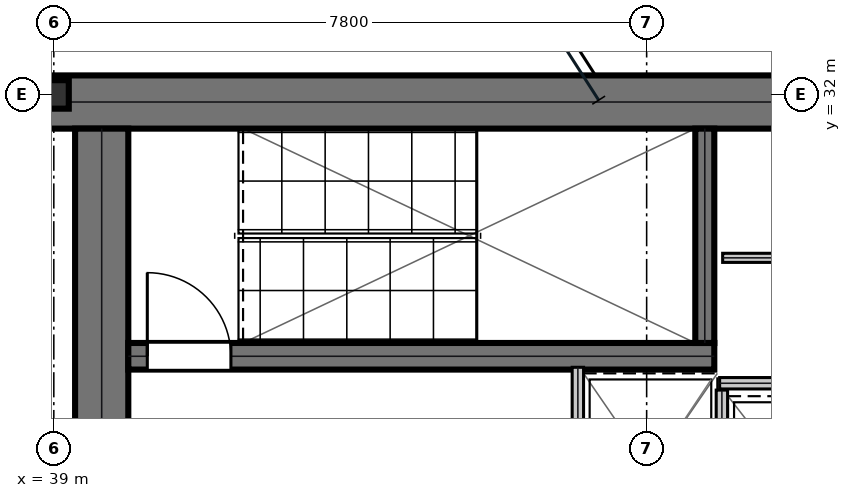
"""IFC4 building model, lengths in metres.
Left out: names, types, materials, properties, quantities, classifications, styles, units other than length and angle.
Written with IfcOpenShell. Run it as: python <this file> out.ifc"""

import sys

from ifc_helpers import new_model, si_unit, direction, frame, frame_2d, origin, origin_2d, place, context, subcontext, project, spatial, rectangle, i_section, extrude, element, fill, save


model = new_model("IFC4")
c1 = context("Model", 3, precision=1e-05, world=origin(), true_north=direction((0.0, 1.0)))
c2 = subcontext(c1, "Body", "Model", "MODEL_VIEW")
j1 = project(units=[si_unit("LENGTHUNIT", "METRE"), si_unit("PLANEANGLEUNIT", "RADIAN")], contexts=[c1])
p1 = place(None, origin())
s1 = spatial("IfcSite", under=j1, at=p1, CompositionType="ELEMENT")
p2 = place(p1, origin())
s2 = spatial("IfcBuilding", under=s1, at=p2, CompositionType="ELEMENT")
p3 = place(p2, frame((0.0, 0.0, 191.85)))
s3 = spatial("IfcBuildingStorey", under=s2, at=p3, CompositionType="ELEMENT", Elevation=191.85)
p4 = place(p3, frame((38.8, 31.9, 0.0), z_axis=(0.0, 0.0, 1.0), x_axis=(1.0, 0.0, 0.0)))
e1 = element("IfcWall", 1, at=p4, inside=s3, PredefinedType="SHEAR", context=c2, shape_type="SweptSolid", body=[
    extrude(rectangle(XDim=16.0, YDim=0.7, at=frame_2d((8.0, 0.0))), origin(), (0.0, 0.0, 1.0), 3.79),
])
p5 = place(p3, frame((39.63, 25.4, 0.0), z_axis=(0.0, 0.0, 1.0), x_axis=(0.0, 1.0, 0.0)))
e2 = element("IfcWall", 2, at=p5, inside=s3, PredefinedType="SHEAR", context=c2, shape_type="SweptSolid", body=[
    extrude(rectangle(XDim=6.15, YDim=0.7, at=frame_2d((3.075, 0.0))), origin(), (0.0, 0.0, 1.0), 3.79),
])
p6 = place(p3, frame((39.98, 28.555, 0.0), z_axis=(0.0, 0.0, 1.0), x_axis=(1.0, 0.0, 0.0)))
e3 = element("IfcWall", 3, at=p6, inside=s3, PredefinedType="SHEAR", context=c2, shape_type="SweptSolid", body=[
    extrude(rectangle(XDim=7.71, YDim=0.35, at=frame_2d((3.855, 0.0))), origin(), (0.0, 0.0, 1.0), 3.79),
])
p7 = place(p6, frame((0.25, 0.0, 0.0)))
e4 = element("IfcOpeningElement", 4, at=p7, cuts=e3, PredefinedType="OPENING", context=c2, shape_type="SweptSolid", body=[
    extrude(rectangle(XDim=1.1, YDim=2.15, at=frame_2d((0.55, 1.075))), frame((0.0, 0.185, 0.0), z_axis=(0.0, -1.0, 0.0), x_axis=(1.0, 0.0, 0.0)), (0.0, 0.0, 1.0), 0.37),
])
p8 = place(p3, frame((47.565, 28.73, 0.0), z_axis=(0.0, 0.0, 1.0), x_axis=(0.0, 1.0, 0.0)))
e5 = element("IfcWall", 5, at=p8, inside=s3, PredefinedType="SHEAR", context=c2, shape_type="SweptSolid", body=[
    extrude(rectangle(XDim=2.82, YDim=0.25, at=frame_2d((1.41, 0.0))), origin(), (0.0, 0.0, 1.0), 3.79),
])
p9 = place(p3, frame((39.0, 32.0, 0.0), z_axis=(0.0, 0.0, 1.0), x_axis=(1.0, 0.0, 0.0)))
e6 = element("IfcColumn", 6, at=p9, inside=s3, PredefinedType="COLUMN", context=c2, shape_type="SweptSolid", body=[
    extrude(i_section(OverallWidth=0.394, OverallDepth=0.375, WebThickness=0.017, FlangeThickness=0.028, at=origin_2d()), origin(), (0.0, 0.0, 1.0), 4.044),
])
p10 = place(p3, frame((45.895, 25.69, 0.0), z_axis=(0.0, 0.0, 1.0), x_axis=(0.0, 1.0, 0.0)))
e7 = element("IfcWall", 7, at=p10, inside=s3, PredefinedType="PARTITIONING", context=c2, shape_type="SweptSolid", body=[
    extrude(rectangle(XDim=2.72, YDim=0.15, at=frame_2d((1.36, 0.0))), origin(), (0.0, 0.0, 1.0), 3.79),
])
p11 = place(p10, frame((0.81, 0.0, 0.0)))
e8 = element("IfcOpeningElement", 8, at=p11, cuts=e7, PredefinedType="OPENING", context=c2, shape_type="SweptSolid", body=[
    extrude(rectangle(XDim=1.1, YDim=2.15, at=frame_2d((0.55, 1.075))), frame((0.0, 0.085, 0.0), z_axis=(0.0, -1.0, 0.0), x_axis=(1.0, 0.0, 0.0)), (0.0, 0.0, 1.0), 0.17),
])
p12 = place(p3, frame((47.79, 25.695, 0.0), z_axis=(0.0, 0.0, 1.0), x_axis=(0.0, 1.0, 0.0)))
e9 = element("IfcWall", 9, at=p12, inside=s3, PredefinedType="PARTITIONING", context=c2, shape_type="SweptSolid", body=[
    extrude(rectangle(XDim=2.415, YDim=0.15, at=frame_2d((1.208, 0.0))), origin(), (0.0, 0.0, 1.0), 3.79),
])
p13 = place(p3, frame((47.76, 28.2, 0.0), z_axis=(0.0, 0.0, 1.0), x_axis=(1.0, 0.0, 0.0)))
e10 = element("IfcWall", 10, at=p13, inside=s3, PredefinedType="PARTITIONING", context=c2, shape_type="SweptSolid", body=[
    extrude(rectangle(XDim=2.04, YDim=0.15, at=frame_2d((1.02, 0.0))), origin(), (0.0, 0.0, 1.0), 3.79),
])
p14 = place(p3, frame((47.8, 29.85, 0.0), z_axis=(0.0, 0.0, 1.0), x_axis=(1.0, 0.0, 0.0)))
e11 = element("IfcWall", 11, at=p14, inside=s3, PredefinedType="PARTITIONING", context=c2, shape_type="SweptSolid", body=[
    extrude(rectangle(XDim=5.86, YDim=0.12, at=frame_2d((2.93, 0.0))), origin(), (0.0, 0.0, 1.0), 3.79),
])
p15 = place(p14, frame((2.6, 0.0, 0.0)))
e12 = element("IfcOpeningElement", 12, at=p15, cuts=e11, PredefinedType="OPENING", context=c2, shape_type="SweptSolid", body=[
    extrude(rectangle(XDim=0.85, YDim=2.15, at=frame_2d((0.425, 1.075))), frame((0.0, 0.07, 0.0), z_axis=(0.0, -1.0, 0.0), x_axis=(1.0, 0.0, 0.0)), (0.0, 0.0, 1.0), 0.14),
])
p16 = place(p7, origin())
e13 = element("IfcDoor", 13, at=p16, inside=s3, OperationType="SINGLE_SWING_LEFT", PredefinedType="DOOR", context=c2, shape_type="SweptSolid", body=[
    extrude(rectangle(XDim=1.1, YDim=2.15, at=frame_2d((0.55, 1.075))), frame((0.0, 0.025, 0.0), z_axis=(0.0, -1.0, 0.0), x_axis=(1.0, 0.0, 0.0)), (0.0, 0.0, 1.0), 0.05),
])
fill(e4, e13)
save(model, sys.argv[1])
